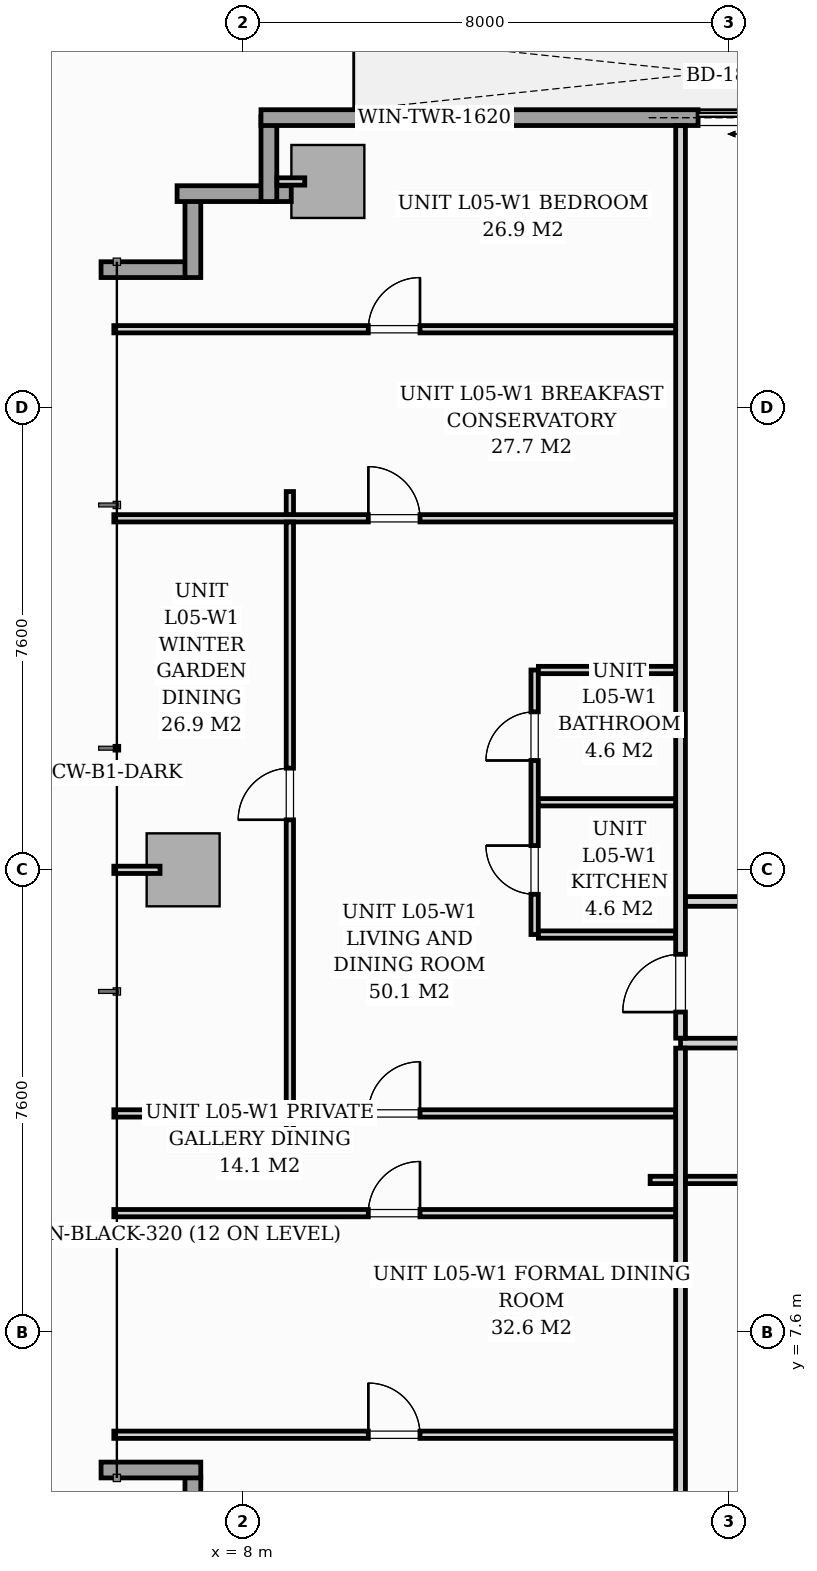
"""IFC4 building model, lengths in metres.
Left out: names, types, materials, properties, quantities, classifications, styles, units other than length and angle.
Written with IfcOpenShell. Run it as: python <this file> out.ifc"""

import sys

from ifc_helpers import new_model, si_unit, direction, frame, frame_2d, origin, origin_2d, place, context, subcontext, project, spatial, rectangle, extrude, source, transform, mapped, element, fill, save


model = new_model("IFC4")
c1 = context("Model", 3, precision=1e-05, world=origin(), true_north=direction((0.0, 1.0)))
c2 = subcontext(c1, "Body", "Model", "MODEL_VIEW")
j1 = project(units=[si_unit("LENGTHUNIT", "METRE"), si_unit("PLANEANGLEUNIT", "RADIAN")], contexts=[c1])
p1 = place(None, origin())
s1 = spatial("IfcSite", under=j1, at=p1, CompositionType="ELEMENT")
p2 = place(p1, origin())
s2 = spatial("IfcBuilding", under=s1, at=p2, CompositionType="ELEMENT")
p3 = place(p2, frame((0.0, 0.0, 23.0)))
s3 = spatial("IfcBuildingStorey", under=s2, at=p3, CompositionType="ELEMENT", Elevation=23.0)
m1 = source(origin(), c2, "Body", "SweptSolid", [
    extrude(rectangle(XDim=1.2, YDim=1.2, at=origin_2d()), origin(), (0.0, 0.0, 1.0), 3.194),
])
for number, where, z_axis, x_axis in (
    (1, (9.4, 26.52, 0.004), (0.0, 0.0, 1.0), (1.0, 0.0, 0.0)),
    (2, (7.02, 15.2, 0.004), (0.0, 0.0, 1.0), (1.0, 0.0, 0.0)),
):
    element("IfcColumn", number, at=place(p3, frame(where, z_axis=z_axis, x_axis=x_axis)), inside=s3, PredefinedType="COLUMN", context=c2, shape_type="MappedRepresentation", body=[
        mapped(m1, transform((0.0, 0.0, 0.0), scale=1.0)),
    ])
p4 = place(p3, frame((7.18, 4.065, 0.0), z_axis=(0.0, 0.0, 1.0), x_axis=(0.0, 1.0, 0.0)))
e3 = element("IfcWall", 3, at=p4, inside=s3, PredefinedType="STANDARD", context=c2, shape_type="SweptSolid", body=[
    extrude(rectangle(XDim=1.15, YDim=0.26, at=frame_2d((0.575, 0.0))), origin(), (0.0, 0.0, 1.0), 2.94),
])
p5 = place(p3, frame((7.31, 5.33, 0.0), z_axis=(0.0, 0.0, 1.0), x_axis=(-1.0, 0.0, 0.0)))
e4 = element("IfcWall", 4, at=p5, inside=s3, PredefinedType="STANDARD", context=c2, shape_type="SweptSolid", body=[
    extrude(rectangle(XDim=1.64, YDim=0.26, at=frame_2d((0.82, 0.0))), origin(), (0.0, 0.0, 1.0), 2.94),
])
for number, where, z_axis, x_axis in (
    (5, (5.67, 25.07, 0.0), (0.0, 0.0, 1.0), (1.0, 0.0, 0.0)),
    (6, (7.18, 24.94, 0.0), (0.0, 0.0, 1.0), (0.0, 1.0, 0.0)),
):
    element("IfcWall", number, at=place(p3, frame(where, z_axis=z_axis, x_axis=x_axis)), inside=s3, PredefinedType="STANDARD", context=c2, shape_type="SweptSolid", body=[
        extrude(rectangle(XDim=1.395, YDim=0.26, at=frame_2d((0.698, 0.0))), origin(), (0.0, 0.0, 1.0), 2.94),
    ])
p6 = place(p3, frame((6.92, 26.32, 0.0), z_axis=(0.0, 0.0, 1.0), x_axis=(1.0, 0.0, 0.0)))
e7 = element("IfcWall", 7, at=p6, inside=s3, PredefinedType="STANDARD", context=c2, shape_type="SweptSolid", body=[
    extrude(rectangle(XDim=1.878, YDim=0.26, at=frame_2d((0.939, 0.0))), origin(), (0.0, 0.0, 1.0), 2.94),
])
p7 = place(p3, frame((8.43, 26.19, 0.0), z_axis=(0.0, 0.0, 1.0), x_axis=(0.0, 1.0, 0.0)))
e8 = element("IfcWall", 8, at=p7, inside=s3, PredefinedType="STANDARD", context=c2, shape_type="SweptSolid", body=[
    extrude(rectangle(XDim=1.395, YDim=0.26, at=frame_2d((0.698, 0.0))), origin(), (0.0, 0.0, 1.0), 2.94),
])
p8 = place(p3, frame((8.3, 27.57, 0.0), z_axis=(0.0, 0.0, 1.0), x_axis=(1.0, 0.0, 0.0)))
e9 = element("IfcWall", 9, at=p8, inside=s3, PredefinedType="STANDARD", context=c2, shape_type="SweptSolid", body=[
    extrude(rectangle(XDim=17.15, YDim=0.26, at=frame_2d((8.575, 0.0))), origin(), (0.0, 0.0, 1.0), 2.94),
])
p9 = place(p8, frame((7.188, 0.0, 0.0)))
e10 = element("IfcOpeningElement", 10, at=p9, cuts=e9, PredefinedType="OPENING", context=c2, shape_type="SweptSolid", body=[
    extrude(rectangle(XDim=1.8, YDim=2.06, at=frame_2d((0.9, 1.03))), frame((0.0, 0.14, 0.0), z_axis=(0.0, -1.0, 0.0), x_axis=(1.0, 0.0, 0.0)), (0.0, 0.0, 1.0), 0.28),
])
p10 = place(p8, frame((2.05, 0.0, 0.65)))
e11 = element("IfcOpeningElement", 11, at=p10, cuts=e9, PredefinedType="OPENING", context=c2, shape_type="SweptSolid", body=[
    extrude(rectangle(XDim=1.6, YDim=1.5, at=frame_2d((0.8, 0.75))), frame((0.0, 0.14, 0.0), z_axis=(0.0, -1.0, 0.0), x_axis=(1.0, 0.0, 0.0)), (0.0, 0.0, 1.0), 0.28),
])
p11 = place(p3, frame((15.2, 12.35, 0.0), z_axis=(0.0, 0.0, 1.0), x_axis=(1.0, 0.0, 0.0)))
e12 = element("IfcWall", 12, at=p11, inside=s3, PredefinedType="PARTITIONING", context=c2, shape_type="SweptSolid", body=[
    extrude(rectangle(XDim=37.1, YDim=0.16, at=frame_2d((18.55, 0.0))), origin(), (0.0, 0.0, 1.0), 2.94),
])
p12 = place(p11, frame((2.964, 0.0, 0.0)))
e13 = element("IfcOpeningElement", 13, at=p12, cuts=e12, PredefinedType="OPENING", context=c2, shape_type="SweptSolid", body=[
    extrude(rectangle(XDim=0.95, YDim=2.06, at=frame_2d((0.475, 1.03))), frame((0.0, 0.09, 0.0), z_axis=(0.0, -1.0, 0.0), x_axis=(1.0, 0.0, 0.0)), (0.0, 0.0, 1.0), 0.18),
])
p13 = place(p11, frame((28.202, 0.0, 0.0)))
e14 = element("IfcOpeningElement", 14, at=p13, cuts=e12, PredefinedType="OPENING", context=c2, shape_type="SweptSolid", body=[
    extrude(rectangle(XDim=0.95, YDim=2.06, at=frame_2d((0.475, 1.03))), frame((0.0, 0.09, 0.0), z_axis=(0.0, -1.0, 0.0), x_axis=(1.0, 0.0, 0.0)), (0.0, 0.0, 1.0), 0.18),
])
p14 = place(p3, frame((15.2, 2.962, 0.0), z_axis=(0.0, 0.0, 1.0), x_axis=(0.0, 1.0, 0.0)))
e15 = element("IfcWall", 15, at=p14, inside=s3, PredefinedType="PARTITIONING", context=c2, shape_type="SweptSolid", body=[
    extrude(rectangle(XDim=9.306, YDim=0.16, at=frame_2d((4.653, 0.0))), origin(), (0.0, 0.0, 1.0), 2.94),
])
p15 = place(p3, frame((15.2, 12.432, 0.0), z_axis=(0.0, 0.0, 1.0), x_axis=(0.0, 1.0, 0.0)))
e16 = element("IfcWall", 16, at=p15, inside=s3, PredefinedType="PARTITIONING", context=c2, shape_type="SweptSolid", body=[
    extrude(rectangle(XDim=15.006, YDim=0.16, at=frame_2d((7.503, 0.0))), origin(), (0.0, 0.0, 1.0), 2.94),
])
p16 = place(p15, frame((0.429, 0.0, 0.0)))
e17 = element("IfcOpeningElement", 17, at=p16, cuts=e16, PredefinedType="OPENING", context=c2, shape_type="SweptSolid", body=[
    extrude(rectangle(XDim=0.95, YDim=2.06, at=frame_2d((0.475, 1.03))), frame((0.0, 0.09, 0.0), z_axis=(0.0, -1.0, 0.0), x_axis=(1.0, 0.0, 0.0)), (0.0, 0.0, 1.0), 0.18),
])
p17 = place(p3, frame((14.7, 10.1, 0.0), z_axis=(0.0, 0.0, 1.0), x_axis=(1.0, 0.0, 0.0)))
e18 = element("IfcWall", 18, at=p17, inside=s3, PredefinedType="PARTITIONING", context=c2, shape_type="SweptSolid", body=[
    extrude(rectangle(XDim=0.418, YDim=0.12, at=frame_2d((0.209, 0.0))), origin(), (0.0, 0.0, 1.0), 2.94),
])
p18 = place(p3, frame((15.282, 10.1, 0.0), z_axis=(0.0, 0.0, 1.0), x_axis=(1.0, 0.0, 0.0)))
e19 = element("IfcWall", 19, at=p18, inside=s3, PredefinedType="PARTITIONING", context=c2, shape_type="SweptSolid", body=[
    extrude(rectangle(XDim=2.892, YDim=0.12, at=frame_2d((1.446, 0.0))), origin(), (0.0, 0.0, 1.0), 2.94),
])
p19 = place(p3, frame((12.8, 14.136, 0.0), z_axis=(0.0, 0.0, 1.0), x_axis=(0.0, 1.0, 0.0)))
e20 = element("IfcWall", 20, at=p19, inside=s3, PredefinedType="PARTITIONING", context=c2, shape_type="SweptSolid", body=[
    extrude(rectangle(XDim=4.35, YDim=0.12, at=frame_2d((2.175, 0.0))), origin(), (0.0, 0.0, 1.0), 2.94),
])
p20 = place(p19, frame((0.662, 0.0, 0.0)))
e21 = element("IfcOpeningElement", 21, at=p20, cuts=e20, PredefinedType="OPENING", context=c2, shape_type="SweptSolid", body=[
    extrude(rectangle(XDim=0.8, YDim=2.0, at=frame_2d((0.4, 1.0))), frame((0.0, 0.07, 0.0), z_axis=(0.0, -1.0, 0.0), x_axis=(1.0, 0.0, 0.0)), (0.0, 0.0, 1.0), 0.14),
])
p21 = place(p19, frame((2.862, 0.0, 0.0)))
e22 = element("IfcOpeningElement", 22, at=p21, cuts=e20, PredefinedType="OPENING", context=c2, shape_type="SweptSolid", body=[
    extrude(rectangle(XDim=0.8, YDim=2.02, at=frame_2d((0.4, 1.01))), frame((0.0, 0.07, 0.0), z_axis=(0.0, -1.0, 0.0), x_axis=(1.0, 0.0, 0.0)), (0.0, 0.0, 1.0), 0.14),
])
p22 = place(p3, frame((12.862, 16.311, 0.0), z_axis=(0.0, 0.0, 1.0), x_axis=(1.0, 0.0, 0.0)))
e23 = element("IfcWall", 23, at=p22, inside=s3, PredefinedType="PARTITIONING", context=c2, shape_type="SweptSolid", body=[
    extrude(rectangle(XDim=2.256, YDim=0.12, at=frame_2d((1.128, 0.0))), origin(), (0.0, 0.0, 1.0), 2.045),
])
for number, where, z_axis, x_axis in (
    (24, (12.862, 14.136, 0.0), (0.0, 0.0, 1.0), (1.0, 0.0, 0.0)),
    (25, (12.862, 18.486, 0.0), (0.0, 0.0, 1.0), (1.0, 0.0, 0.0)),
):
    element("IfcWall", number, at=place(p3, frame(where, z_axis=z_axis, x_axis=x_axis)), inside=s3, PredefinedType="PARTITIONING", context=c2, shape_type="SweptSolid", body=[
        extrude(rectangle(XDim=2.256, YDim=0.12, at=frame_2d((1.128, 0.0))), origin(), (0.0, 0.0, 1.0), 2.94),
    ])
p23 = place(p3, frame((5.88, 24.09, 0.0), z_axis=(0.0, 0.0, 1.0), x_axis=(1.0, 0.0, 0.0)))
e26 = element("IfcWall", 26, at=p23, inside=s3, PredefinedType="PARTITIONING", context=c2, shape_type="SweptSolid", body=[
    extrude(rectangle(XDim=9.238, YDim=0.12, at=frame_2d((4.619, 0.0))), origin(), (0.0, 0.0, 1.0), 2.94),
])
p24 = place(p23, frame((4.185, 0.0, 0.0)))
e27 = element("IfcOpeningElement", 27, at=p24, cuts=e26, PredefinedType="OPENING", context=c2, shape_type="SweptSolid", body=[
    extrude(rectangle(XDim=0.85, YDim=2.05, at=frame_2d((0.425, 1.025))), frame((0.0, 0.07, 0.0), z_axis=(0.0, -1.0, 0.0), x_axis=(1.0, 0.0, 0.0)), (0.0, 0.0, 1.0), 0.14),
])
p25 = place(p3, frame((5.88, 5.91, 0.0), z_axis=(0.0, 0.0, 1.0), x_axis=(1.0, 0.0, 0.0)))
e28 = element("IfcWall", 28, at=p25, inside=s3, PredefinedType="PARTITIONING", context=c2, shape_type="SweptSolid", body=[
    extrude(rectangle(XDim=9.238, YDim=0.12, at=frame_2d((4.619, 0.0))), origin(), (0.0, 0.0, 1.0), 2.94),
])
p26 = place(p25, frame((4.185, 0.0, 0.0)))
e29 = element("IfcOpeningElement", 29, at=p26, cuts=e28, PredefinedType="OPENING", context=c2, shape_type="SweptSolid", body=[
    extrude(rectangle(XDim=0.85, YDim=2.05, at=frame_2d((0.425, 1.025))), frame((0.0, 0.07, 0.0), z_axis=(0.0, -1.0, 0.0), x_axis=(1.0, 0.0, 0.0)), (0.0, 0.0, 1.0), 0.14),
])
p27 = place(p3, frame((5.88, 9.554, 0.0), z_axis=(0.0, 0.0, 1.0), x_axis=(1.0, 0.0, 0.0)))
e30 = element("IfcWall", 30, at=p27, inside=s3, PredefinedType="PARTITIONING", context=c2, shape_type="SweptSolid", body=[
    extrude(rectangle(XDim=9.238, YDim=0.12, at=frame_2d((4.619, 0.0))), origin(), (0.0, 0.0, 1.0), 2.94),
])
p28 = place(p27, frame((4.185, 0.0, 0.0)))
e31 = element("IfcOpeningElement", 31, at=p28, cuts=e30, PredefinedType="OPENING", context=c2, shape_type="SweptSolid", body=[
    extrude(rectangle(XDim=0.85, YDim=2.05, at=frame_2d((0.425, 1.025))), frame((0.0, 0.07, 0.0), z_axis=(0.0, -1.0, 0.0), x_axis=(1.0, 0.0, 0.0)), (0.0, 0.0, 1.0), 0.14),
])
p29 = place(p3, frame((5.88, 20.981, 0.0), z_axis=(0.0, 0.0, 1.0), x_axis=(1.0, 0.0, 0.0)))
e32 = element("IfcWall", 32, at=p29, inside=s3, PredefinedType="PARTITIONING", context=c2, shape_type="SweptSolid", body=[
    extrude(rectangle(XDim=9.238, YDim=0.12, at=frame_2d((4.619, 0.0))), origin(), (0.0, 0.0, 1.0), 2.94),
])
p30 = place(p29, frame((4.185, 0.0, 0.0)))
e33 = element("IfcOpeningElement", 33, at=p30, cuts=e32, PredefinedType="OPENING", context=c2, shape_type="SweptSolid", body=[
    extrude(rectangle(XDim=0.85, YDim=2.05, at=frame_2d((0.425, 1.025))), frame((0.0, 0.07, 0.0), z_axis=(0.0, -1.0, 0.0), x_axis=(1.0, 0.0, 0.0)), (0.0, 0.0, 1.0), 0.14),
])
p31 = place(p3, frame((5.88, 11.194, 0.0), z_axis=(0.0, 0.0, 1.0), x_axis=(1.0, 0.0, 0.0)))
e34 = element("IfcWall", 34, at=p31, inside=s3, PredefinedType="PARTITIONING", context=c2, shape_type="SweptSolid", body=[
    extrude(rectangle(XDim=9.238, YDim=0.12, at=frame_2d((4.619, 0.0))), origin(), (0.0, 0.0, 1.0), 2.94),
])
p32 = place(p31, frame((4.185, 0.0, 0.0)))
e35 = element("IfcOpeningElement", 35, at=p32, cuts=e34, PredefinedType="OPENING", context=c2, shape_type="SweptSolid", body=[
    extrude(rectangle(XDim=0.85, YDim=2.05, at=frame_2d((0.425, 1.025))), frame((0.0, 0.07, 0.0), z_axis=(0.0, -1.0, 0.0), x_axis=(1.0, 0.0, 0.0)), (0.0, 0.0, 1.0), 0.14),
])
p33 = place(p3, frame((8.775, 10.754, 0.0), z_axis=(0.0, 0.0, 1.0), x_axis=(0.0, 1.0, 0.0)))
e36 = element("IfcWall", 36, at=p33, inside=s3, PredefinedType="PARTITIONING", context=c2, shape_type="SweptSolid", body=[
    extrude(rectangle(XDim=0.378, YDim=0.12, at=frame_2d((0.189, 0.0))), origin(), (0.0, 0.0, 1.0), 2.94),
])
p34 = place(p3, frame((8.775, 11.256, 0.0), z_axis=(0.0, 0.0, 1.0), x_axis=(0.0, 1.0, 0.0)))
e37 = element("IfcWall", 37, at=p34, inside=s3, PredefinedType="PARTITIONING", context=c2, shape_type="SweptSolid", body=[
    extrude(rectangle(XDim=9.663, YDim=0.12, at=frame_2d((4.832, 0.0))), origin(), (0.0, 0.0, 1.0), 2.94),
])
p35 = place(p34, frame((4.766, 0.0, 0.0)))
e38 = element("IfcOpeningElement", 38, at=p35, cuts=e37, PredefinedType="OPENING", context=c2, shape_type="SweptSolid", body=[
    extrude(rectangle(XDim=0.85, YDim=2.05, at=frame_2d((0.425, 1.025))), frame((0.0, 0.07, 0.0), z_axis=(0.0, -1.0, 0.0), x_axis=(1.0, 0.0, 0.0)), (0.0, 0.0, 1.0), 0.14),
])
p36 = place(p3, frame((8.775, 21.043, 0.0), z_axis=(0.0, 0.0, 1.0), x_axis=(0.0, 1.0, 0.0)))
e39 = element("IfcWall", 39, at=p36, inside=s3, PredefinedType="PARTITIONING", context=c2, shape_type="SweptSolid", body=[
    extrude(rectangle(XDim=0.378, YDim=0.12, at=frame_2d((0.189, 0.0))), origin(), (0.0, 0.0, 1.0), 2.94),
])
p37 = place(p3, frame((15.282, 14.68, 0.0), z_axis=(0.0, 0.0, 1.0), x_axis=(1.0, 0.0, 0.0)))
e40 = element("IfcWall", 40, at=p37, inside=s3, PredefinedType="PARTITIONING", context=c2, shape_type="SweptSolid", body=[
    extrude(rectangle(XDim=10.878, YDim=0.16, at=frame_2d((5.439, 0.0))), origin(), (0.0, 0.0, 1.0), 2.94),
])
p38 = place(p37, frame((4.863, 0.0, 0.0)))
e41 = element("IfcOpeningElement", 41, at=p38, cuts=e40, PredefinedType="OPENING", context=c2, shape_type="SweptSolid", body=[
    extrude(rectangle(XDim=0.95, YDim=2.06, at=frame_2d((0.475, 1.03))), frame((0.0, 0.09, 0.0), z_axis=(0.0, -1.0, 0.0), x_axis=(1.0, 0.0, 0.0)), (0.0, 0.0, 1.0), 0.18),
])
p39 = place(p3, frame((9.02, 26.52, 0.0), z_axis=(0.0, 0.0, 1.0), x_axis=(-1.0, 0.0, 0.0)))
e42 = element("IfcWall", 42, at=p39, inside=s3, PredefinedType="PARTITIONING", context=c2, shape_type="SweptSolid", body=[
    extrude(rectangle(XDim=0.458, YDim=0.12, at=frame_2d((0.229, 0.0))), origin(), (0.0, 0.0, 1.0), 2.94),
])
p40 = place(p3, frame((6.64, 15.2, 0.0), z_axis=(0.0, 0.0, 1.0), x_axis=(-1.0, 0.0, 0.0)))
e43 = element("IfcWall", 43, at=p40, inside=s3, PredefinedType="PARTITIONING", context=c2, shape_type="SweptSolid", body=[
    extrude(rectangle(XDim=0.76, YDim=0.12, at=frame_2d((0.38, 0.0))), origin(), (0.0, 0.0, 1.0), 2.94),
])
m2 = source(origin(), c2, "Body", "SweptSolid", [
    extrude(rectangle(XDim=1.8, YDim=2.06, at=frame_2d((0.9, 1.03))), frame((0.0, 0.025, 0.0), z_axis=(0.0, -1.0, 0.0), x_axis=(1.0, 0.0, 0.0)), (0.0, 0.0, 1.0), 0.05),
])
p41 = place(p9, origin())
e44 = element("IfcDoor", 44, at=p41, inside=s3, OperationType="SLIDING_TO_LEFT", PredefinedType="DOOR", context=c2, shape_type="MappedRepresentation", body=[
    mapped(m2, transform((0.0, 0.0, 0.0), scale=1.0)),
])
fill(e10, e44)
m3 = source(origin(), c2, "Body", "SweptSolid", [
    extrude(rectangle(XDim=1.6, YDim=1.5, at=frame_2d((0.8, 0.75))), frame((0.0, 0.03, 0.0), z_axis=(0.0, -1.0, 0.0), x_axis=(1.0, 0.0, 0.0)), (0.0, 0.0, 1.0), 0.06),
])
p42 = place(p10, origin())
e45 = element("IfcWindow", 45, at=p42, inside=s3, PartitioningType="SINGLE_PANEL", PredefinedType="WINDOW", context=c2, shape_type="MappedRepresentation", body=[
    mapped(m3, transform((0.0, 0.0, 0.0), scale=1.0)),
])
fill(e11, e45)
m4 = source(origin(), c2, "Body", "SweptSolid", [
    extrude(rectangle(XDim=0.95, YDim=2.06, at=frame_2d((0.475, 1.03))), frame((0.0, 0.025, 0.0), z_axis=(0.0, -1.0, 0.0), x_axis=(1.0, 0.0, 0.0)), (0.0, 0.0, 1.0), 0.05),
])
p43 = place(p16, origin())
e46 = element("IfcDoor", 46, at=p43, inside=s3, OperationType="SINGLE_SWING_LEFT", PredefinedType="DOOR", context=c2, shape_type="MappedRepresentation", body=[
    mapped(m4, transform((0.0, 0.0, 0.0), scale=1.0)),
])
fill(e17, e46)
m5 = source(origin(), c2, "Body", "SweptSolid", [
    extrude(rectangle(XDim=0.8, YDim=2.0, at=frame_2d((0.4, 1.0))), frame((0.0, 0.025, 0.0), z_axis=(0.0, -1.0, 0.0), x_axis=(1.0, 0.0, 0.0)), (0.0, 0.0, 1.0), 0.05),
])
p44 = place(p20, origin())
e47 = element("IfcDoor", 47, at=p44, inside=s3, OperationType="SINGLE_SWING_RIGHT", PredefinedType="DOOR", context=c2, shape_type="MappedRepresentation", body=[
    mapped(m5, transform((0.0, 0.0, 0.0), scale=1.0)),
])
fill(e21, e47)
m6 = source(origin(), c2, "Body", "SweptSolid", [
    extrude(rectangle(XDim=0.8, YDim=2.02, at=frame_2d((0.4, 1.01))), frame((0.0, 0.025, 0.0), z_axis=(0.0, -1.0, 0.0), x_axis=(1.0, 0.0, 0.0)), (0.0, 0.0, 1.0), 0.05),
])
p45 = place(p21, origin())
e48 = element("IfcDoor", 48, at=p45, inside=s3, OperationType="SINGLE_SWING_LEFT", PredefinedType="DOOR", context=c2, shape_type="MappedRepresentation", body=[
    mapped(m6, transform((0.0, 0.0, 0.0), scale=1.0)),
])
fill(e22, e48)
m7 = source(origin(), c2, "Body", "SweptSolid", [
    extrude(rectangle(XDim=0.85, YDim=2.05, at=frame_2d((0.425, 1.025))), frame((0.0, 0.025, 0.0), z_axis=(0.0, -1.0, 0.0), x_axis=(1.0, 0.0, 0.0)), (0.0, 0.0, 1.0), 0.05),
])
p46 = place(p24, origin())
e49 = element("IfcDoor", 49, at=p46, inside=s3, OperationType="SINGLE_SWING_RIGHT", PredefinedType="DOOR", context=c2, shape_type="MappedRepresentation", body=[
    mapped(m7, transform((0.0, 0.0, 0.0), scale=1.0)),
])
fill(e27, e49)
p47 = place(p26, origin())
e50 = element("IfcDoor", 50, at=p47, inside=s3, OperationType="SINGLE_SWING_LEFT", PredefinedType="DOOR", context=c2, shape_type="MappedRepresentation", body=[
    mapped(m7, transform((0.0, 0.0, 0.0), scale=1.0)),
])
fill(e29, e50)
p48 = place(p28, origin())
e51 = element("IfcDoor", 51, at=p48, inside=s3, OperationType="SINGLE_SWING_RIGHT", PredefinedType="DOOR", context=c2, shape_type="MappedRepresentation", body=[
    mapped(m7, transform((0.0, 0.0, 0.0), scale=1.0)),
])
fill(e31, e51)
p49 = place(p30, origin())
e52 = element("IfcDoor", 52, at=p49, inside=s3, OperationType="SINGLE_SWING_LEFT", PredefinedType="DOOR", context=c2, shape_type="MappedRepresentation", body=[
    mapped(m7, transform((0.0, 0.0, 0.0), scale=1.0)),
])
fill(e33, e52)
p50 = place(p32, origin())
e53 = element("IfcDoor", 53, at=p50, inside=s3, OperationType="SINGLE_SWING_RIGHT", PredefinedType="DOOR", context=c2, shape_type="MappedRepresentation", body=[
    mapped(m7, transform((0.0, 0.0, 0.0), scale=1.0)),
])
fill(e35, e53)
p51 = place(p35, origin())
e54 = element("IfcDoor", 54, at=p51, inside=s3, OperationType="SINGLE_SWING_LEFT", PredefinedType="DOOR", context=c2, shape_type="MappedRepresentation", body=[
    mapped(m7, transform((0.0, 0.0, 0.0), scale=1.0)),
])
fill(e38, e54)
save(model, sys.argv[1])
